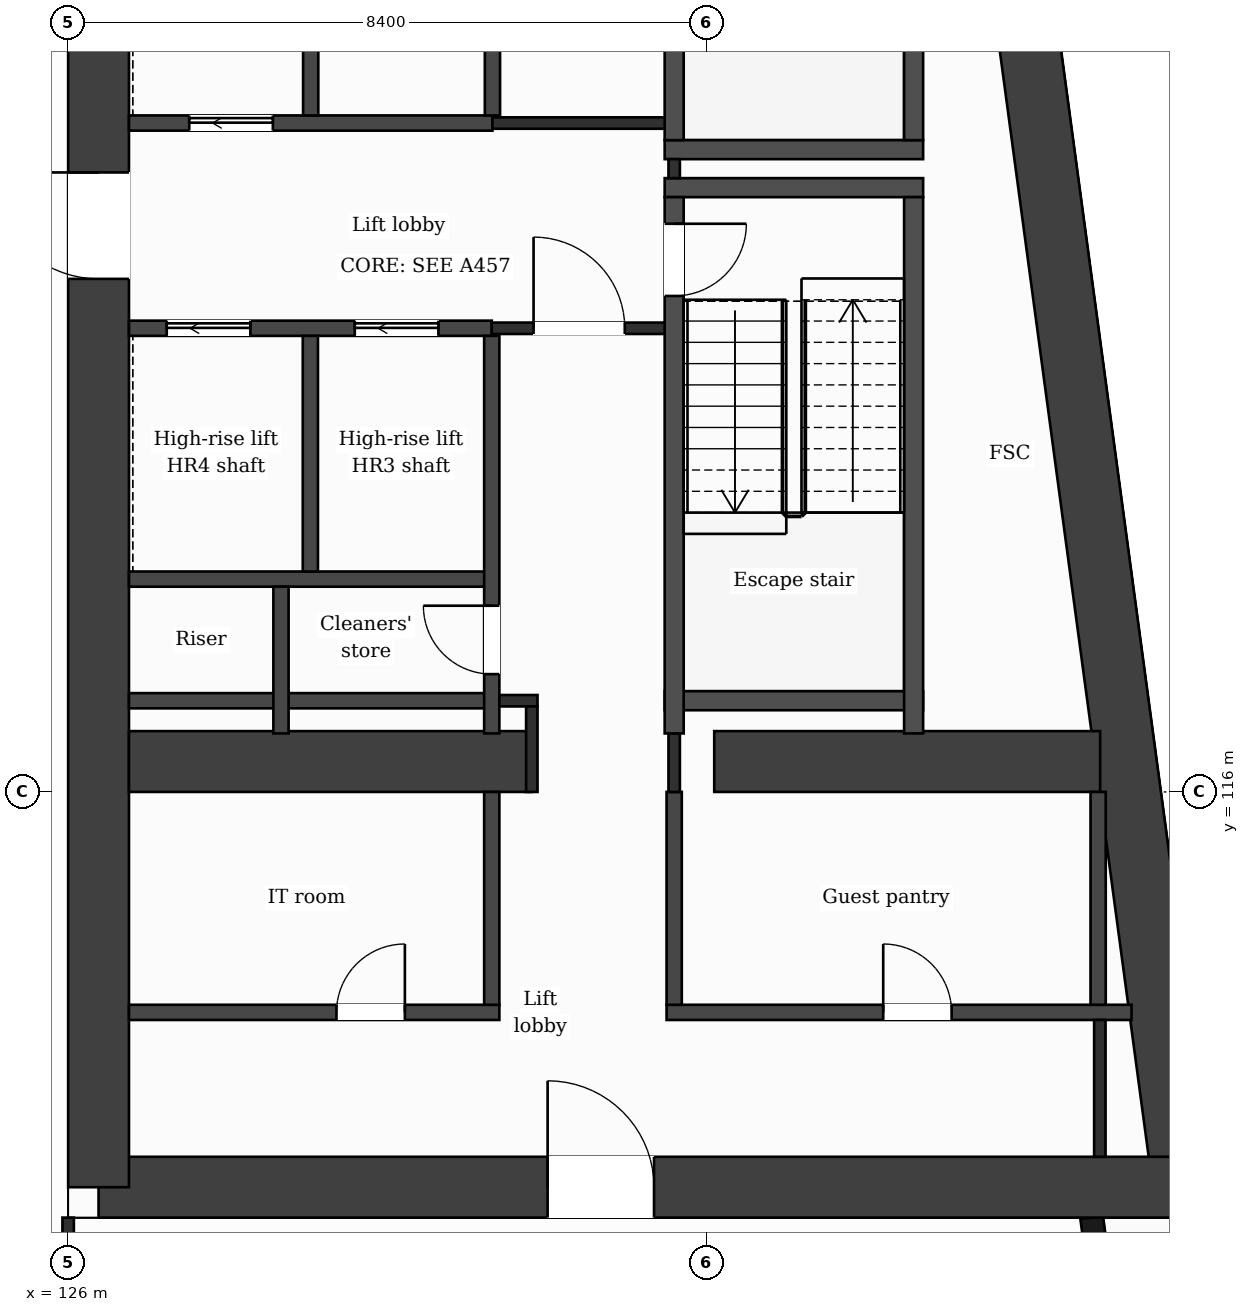
"""IFC4 building model, lengths in metres.
Left out: names, types, materials, properties, quantities, classifications, styles, units other than length and angle.
Written with IfcOpenShell. Run it as: python <this file> out.ifc"""

import sys

from ifc_helpers import new_model, si_unit, direction, frame, frame_2d, origin, place, context, subcontext, project, spatial, rectangle, extrude, element, fill, save


model = new_model("IFC4")
c1 = context("Model", 3, precision=1e-05, world=origin(), true_north=direction((0.0, 1.0)))
c2 = subcontext(c1, "Body", "Model", "MODEL_VIEW")
j1 = project(units=[si_unit("LENGTHUNIT", "METRE"), si_unit("PLANEANGLEUNIT", "RADIAN")], contexts=[c1])
p1 = place(None, origin())
s1 = spatial("IfcSite", under=j1, at=p1, CompositionType="ELEMENT")
p2 = place(p1, origin())
s2 = spatial("IfcBuilding", under=s1, at=p2, CompositionType="ELEMENT")
p3 = place(p2, frame((0.0, 0.0, 231.8)))
s3 = spatial("IfcBuildingStorey", under=s2, at=p3, CompositionType="ELEMENT", Elevation=231.8)
p4 = place(p3, frame((137.82, 132.0, 0.0), z_axis=(0.0, 0.0, 1.0), x_axis=(0.133408347329, -0.991061154956, 0.0)))
e1 = element("IfcWall", 1, at=p4, inside=s3, PredefinedType="SHEAR", context=c2, shape_type="SweptSolid", body=[
    extrude(rectangle(XDim=21.391, YDim=0.8, at=frame_2d((10.696, 0.0))), origin(), (0.0, 0.0, 1.0), 3.7),
])
p5 = place(p3, frame((140.673, 110.8, 0.0), z_axis=(0.0, 0.0, 1.0), x_axis=(-1.0, 0.0, 0.0)))
e2 = element("IfcWall", 2, at=p5, inside=s3, PredefinedType="SHEAR", context=c2, shape_type="SweptSolid", body=[
    extrude(rectangle(XDim=14.273, YDim=0.8, at=frame_2d((7.137, 0.0))), origin(), (0.0, 0.0, 1.0), 3.7),
])
p6 = place(p5, frame((6.965, 0.0, 0.0)))
e3 = element("IfcOpeningElement", 3, at=p6, cuts=e2, PredefinedType="OPENING", context=c2, shape_type="SweptSolid", body=[
    extrude(rectangle(XDim=1.4, YDim=2.1, at=frame_2d((0.7, 1.05))), frame((0.0, 0.41, 0.0), z_axis=(0.0, -1.0, 0.0), x_axis=(1.0, 0.0, 0.0)), (0.0, 0.0, 1.0), 0.82),
])
p7 = place(p3, frame((126.4, 110.8, 0.0), z_axis=(0.0, 0.0, 1.0), x_axis=(0.0, 1.0, 0.0)))
e4 = element("IfcWall", 4, at=p7, inside=s3, PredefinedType="SHEAR", context=c2, shape_type="SweptSolid", body=[
    extrude(rectangle(XDim=21.2, YDim=0.8, at=frame_2d((10.6, 0.0))), origin(), (0.0, 0.0, 1.0), 3.7),
])
p8 = place(p7, frame((11.95, 0.0, 0.0)))
e5 = element("IfcOpeningElement", 5, at=p8, cuts=e4, PredefinedType="OPENING", context=c2, shape_type="SweptSolid", body=[
    extrude(rectangle(XDim=1.4, YDim=2.1, at=frame_2d((0.7, 1.05))), frame((0.0, 0.41, 0.0), z_axis=(0.0, -1.0, 0.0), x_axis=(1.0, 0.0, 0.0)), (0.0, 0.0, 1.0), 0.82),
])
p9 = place(p3, frame((126.8, 116.4, 0.0), z_axis=(0.0, 0.0, 1.0), x_axis=(1.0, 0.0, 0.0)))
e6 = element("IfcWall", 6, at=p9, inside=s3, PredefinedType="SHEAR", context=c2, shape_type="SweptSolid", body=[
    extrude(rectangle(XDim=5.3, YDim=0.8, at=frame_2d((2.65, 0.0))), origin(), (0.0, 0.0, 1.0), 3.7),
])
p10 = place(p3, frame((134.5, 116.4, 0.0), z_axis=(0.0, 0.0, 1.0), x_axis=(1.0, 0.0, 0.0)))
e7 = element("IfcWall", 7, at=p10, inside=s3, PredefinedType="SHEAR", context=c2, shape_type="SweptSolid", body=[
    extrude(rectangle(XDim=5.077, YDim=0.8, at=frame_2d((2.539, 0.0))), origin(), (0.0, 0.0, 1.0), 3.7),
])
p11 = place(p3, frame((140.348, 103.85, 0.0), z_axis=(0.0, 0.0, 1.0), x_axis=(-0.133431549479, 0.991058031401, 0.0)))
e8 = element("IfcWall", 8, at=p11, inside=s3, PredefinedType="SOLIDWALL", context=c2, shape_type="SweptSolid", body=[
    extrude(rectangle(XDim=6.609, YDim=0.3, at=frame_2d((3.304, 0.0))), origin(), (0.0, 0.0, 1.0), 3.38),
])
p12 = place(p11, frame((0.737, 0.0, 0.9)))
e9 = element("IfcOpeningElement", 9, at=p12, cuts=e8, PredefinedType="OPENING", context=c2, shape_type="SweptSolid", body=[
    extrude(rectangle(XDim=1.2, YDim=2.1, at=frame_2d((0.6, 1.05))), frame((0.0, 0.16, 0.0), z_axis=(0.0, -1.0, 0.0), x_axis=(1.0, 0.0, 0.0)), (0.0, 0.0, 1.0), 0.32),
])
p13 = place(p11, frame((3.991, 0.0, 0.0)))
e10 = element("IfcOpeningElement", 10, at=p13, cuts=e8, PredefinedType="OPENING", context=c2, shape_type="SweptSolid", body=[
    extrude(rectangle(XDim=1.2, YDim=2.4, at=frame_2d((0.6, 1.2))), frame((0.0, 0.16, 0.0), z_axis=(0.0, -1.0, 0.0), x_axis=(1.0, 0.0, 0.0)), (0.0, 0.0, 1.0), 0.32),
])
p14 = place(p3, frame((126.8, 113.1, 0.0), z_axis=(0.0, 0.0, 1.0), x_axis=(1.0, 0.0, 0.0)))
e11 = element("IfcWall", 11, at=p14, inside=s3, PredefinedType="PARTITIONING", context=c2, shape_type="SweptSolid", body=[
    extrude(rectangle(XDim=4.873, YDim=0.2, at=frame_2d((2.437, 0.0))), origin(), (0.0, 0.0, 1.0), 3.38),
])
p15 = place(p14, frame((2.73, 0.0, 0.0)))
e12 = element("IfcOpeningElement", 12, at=p15, cuts=e11, PredefinedType="OPENING", context=c2, shape_type="SweptSolid", body=[
    extrude(rectangle(XDim=0.9, YDim=2.1, at=frame_2d((0.45, 1.05))), frame((0.0, 0.11, 0.0), z_axis=(0.0, -1.0, 0.0), x_axis=(1.0, 0.0, 0.0)), (0.0, 0.0, 1.0), 0.22),
])
p16 = place(p3, frame((133.873, 113.1, 0.0), z_axis=(0.0, 0.0, 1.0), x_axis=(1.0, 0.0, 0.0)))
e13 = element("IfcWall", 13, at=p16, inside=s3, PredefinedType="PARTITIONING", context=c2, shape_type="SweptSolid", body=[
    extrude(rectangle(XDim=6.117, YDim=0.2, at=frame_2d((3.059, 0.0))), origin(), (0.0, 0.0, 1.0), 3.38),
])
p17 = place(p16, frame((2.85, 0.0, 0.0)))
e14 = element("IfcOpeningElement", 14, at=p17, cuts=e13, PredefinedType="OPENING", context=c2, shape_type="SweptSolid", body=[
    extrude(rectangle(XDim=0.9, YDim=2.1, at=frame_2d((0.45, 1.05))), frame((0.0, 0.11, 0.0), z_axis=(0.0, -1.0, 0.0), x_axis=(1.0, 0.0, 0.0)), (0.0, 0.0, 1.0), 0.22),
])
p18 = place(p3, frame((126.8, 117.2, 0.0), z_axis=(0.0, 0.0, 1.0), x_axis=(1.0, 0.0, 0.0)))
e15 = element("IfcWall", 15, at=p18, inside=s3, PredefinedType="PARTITIONING", context=c2, shape_type="SweptSolid", body=[
    extrude(rectangle(XDim=4.773, YDim=0.2, at=frame_2d((2.386, 0.0))), origin(), (0.0, 0.0, 1.0), 3.38),
])
p19 = place(p3, frame((131.573, 117.2, 0.0), z_axis=(0.0, 0.0, 1.0), x_axis=(1.0, 0.0, 0.0)))
e16 = element("IfcWall", 16, at=p19, inside=s3, PredefinedType="PARTITIONING", context=c2, shape_type="SweptSolid", body=[
    extrude(rectangle(XDim=0.602, YDim=0.15, at=frame_2d((0.301, 0.0))), origin(), (0.0, 0.0, 1.0), 3.38),
])
p20 = place(p3, frame((133.848, 117.2, 0.0), z_axis=(0.0, 0.0, 1.0), x_axis=(1.0, 0.0, 0.0)))
e17 = element("IfcWall", 17, at=p20, inside=s3, PredefinedType="PARTITIONING", context=c2, shape_type="SweptSolid", body=[
    extrude(rectangle(XDim=3.4, YDim=0.25, at=frame_2d((1.7, 0.0))), origin(), (0.0, 0.0, 1.0), 3.38),
])
p21 = place(p3, frame((126.8, 118.8, 0.0), z_axis=(0.0, 0.0, 1.0), x_axis=(1.0, 0.0, 0.0)))
e18 = element("IfcWall", 18, at=p21, inside=s3, PredefinedType="PARTITIONING", context=c2, shape_type="SweptSolid", body=[
    extrude(rectangle(XDim=4.773, YDim=0.2, at=frame_2d((2.386, 0.0))), origin(), (0.0, 0.0, 1.0), 3.38),
])
p22 = place(p3, frame((126.8, 122.1, 0.0), z_axis=(0.0, 0.0, 1.0), x_axis=(1.0, 0.0, 0.0)))
e19 = element("IfcWall", 19, at=p22, inside=s3, PredefinedType="PARTITIONING", context=c2, shape_type="SweptSolid", body=[
    extrude(rectangle(XDim=4.773, YDim=0.2, at=frame_2d((2.386, 0.0))), origin(), (0.0, 0.0, 1.0), 3.38),
])
p23 = place(p22, frame((2.971, 0.0, 0.0)))
e20 = element("IfcOpeningElement", 20, at=p23, cuts=e19, PredefinedType="OPENING", context=c2, shape_type="SweptSolid", body=[
    extrude(rectangle(XDim=1.1, YDim=2.1, at=frame_2d((0.55, 1.05))), frame((0.0, 0.11, 0.0), z_axis=(0.0, -1.0, 0.0), x_axis=(1.0, 0.0, 0.0)), (0.0, 0.0, 1.0), 0.22),
])
p24 = place(p22, frame((0.497, 0.0, 0.0)))
e21 = element("IfcOpeningElement", 21, at=p24, cuts=e19, PredefinedType="OPENING", context=c2, shape_type="SweptSolid", body=[
    extrude(rectangle(XDim=1.1, YDim=2.1, at=frame_2d((0.55, 1.05))), frame((0.0, 0.11, 0.0), z_axis=(0.0, -1.0, 0.0), x_axis=(1.0, 0.0, 0.0)), (0.0, 0.0, 1.0), 0.22),
])
p25 = place(p3, frame((131.573, 122.1, 0.0), z_axis=(0.0, 0.0, 1.0), x_axis=(1.0, 0.0, 0.0)))
e22 = element("IfcWall", 22, at=p25, inside=s3, PredefinedType="PARTITIONING", context=c2, shape_type="SweptSolid", body=[
    extrude(rectangle(XDim=2.4, YDim=0.15, at=frame_2d((1.2, 0.0))), origin(), (0.0, 0.0, 1.0), 3.38),
])
p26 = place(p25, frame((0.55, 0.0, 0.0)))
e23 = element("IfcOpeningElement", 23, at=p26, cuts=e22, PredefinedType="OPENING", context=c2, shape_type="SweptSolid", body=[
    extrude(rectangle(XDim=1.2, YDim=2.1, at=frame_2d((0.6, 1.05))), frame((0.0, 0.085, 0.0), z_axis=(0.0, -1.0, 0.0), x_axis=(1.0, 0.0, 0.0)), (0.0, 0.0, 1.0), 0.17),
])
for number, where, z_axis, x_axis in (
    (24, (133.848, 123.95, 0.0), (0.0, 0.0, 1.0), (1.0, 0.0, 0.0)),
    (25, (133.848, 124.45, 0.0), (0.0, 0.0, 1.0), (1.0, 0.0, 0.0)),
):
    element("IfcWall", number, at=place(p3, frame(where, z_axis=z_axis, x_axis=x_axis)), inside=s3, PredefinedType="PARTITIONING", context=c2, shape_type="SweptSolid", body=[
        extrude(rectangle(XDim=3.4, YDim=0.25, at=frame_2d((1.7, 0.0))), origin(), (0.0, 0.0, 1.0), 3.38),
    ])
p27 = place(p3, frame((126.8, 124.8, 0.0), z_axis=(0.0, 0.0, 1.0), x_axis=(1.0, 0.0, 0.0)))
e26 = element("IfcWall", 26, at=p27, inside=s3, PredefinedType="PARTITIONING", context=c2, shape_type="SweptSolid", body=[
    extrude(rectangle(XDim=4.782, YDim=0.2, at=frame_2d((2.391, 0.0))), origin(), (0.0, 0.0, 1.0), 3.38),
])
p28 = place(p27, frame((0.793, 0.0, 0.0)))
e27 = element("IfcOpeningElement", 27, at=p28, cuts=e26, PredefinedType="OPENING", context=c2, shape_type="SweptSolid", body=[
    extrude(rectangle(XDim=1.1, YDim=2.1, at=frame_2d((0.55, 1.05))), frame((0.0, 0.11, 0.0), z_axis=(0.0, -1.0, 0.0), x_axis=(1.0, 0.0, 0.0)), (0.0, 0.0, 1.0), 0.22),
])
p29 = place(p3, frame((131.582, 124.8, 0.0), z_axis=(0.0, 0.0, 1.0), x_axis=(1.0, 0.0, 0.0)))
e28 = element("IfcWall", 28, at=p29, inside=s3, PredefinedType="PARTITIONING", context=c2, shape_type="SweptSolid", body=[
    extrude(rectangle(XDim=2.516, YDim=0.15, at=frame_2d((1.258, 0.0))), origin(), (0.0, 0.0, 1.0), 3.38),
])
p30 = place(p3, frame((126.0, 109.075, 0.0), z_axis=(0.0, 0.0, 1.0), x_axis=(0.0, 1.0, 0.0)))
e29 = element("IfcWall", 29, at=p30, inside=s3, PredefinedType="PARTITIONING", context=c2, shape_type="SweptSolid", body=[
    extrude(rectangle(XDim=1.325, YDim=0.15, at=frame_2d((0.663, 0.0))), origin(), (0.0, 0.0, 1.0), 3.38),
])
p31 = place(p3, frame((128.8, 116.77, 0.0), z_axis=(0.0, 0.0, 1.0), x_axis=(0.0, 1.0, 0.0)))
e30 = element("IfcWall", 30, at=p31, inside=s3, PredefinedType="PARTITIONING", context=c2, shape_type="SweptSolid", body=[
    extrude(rectangle(XDim=1.93, YDim=0.2, at=frame_2d((0.965, 0.0))), origin(), (0.0, 0.0, 1.0), 3.38),
])
for number, where, z_axis, x_axis in (
    (31, (129.187, 118.9, 0.0), (0.0, 0.0, 1.0), (0.0, 1.0, 0.0)),
    (32, (129.191, 124.9, 0.0), (0.0, 0.0, 1.0), (0.0, 1.0, 0.0)),
):
    element("IfcWall", number, at=place(p3, frame(where, z_axis=z_axis, x_axis=x_axis)), inside=s3, PredefinedType="PARTITIONING", context=c2, shape_type="SweptSolid", body=[
        extrude(rectangle(XDim=3.1, YDim=0.2, at=frame_2d((1.55, 0.0))), origin(), (0.0, 0.0, 1.0), 3.38),
    ])
p32 = place(p3, frame((131.573, 113.2, 0.0), z_axis=(0.0, 0.0, 1.0), x_axis=(0.0, 1.0, 0.0)))
e33 = element("IfcWall", 33, at=p32, inside=s3, PredefinedType="PARTITIONING", context=c2, shape_type="SweptSolid", body=[
    extrude(rectangle(XDim=2.8, YDim=0.2, at=frame_2d((1.4, 0.0))), origin(), (0.0, 0.0, 1.0), 3.38),
])
p33 = place(p3, frame((131.573, 116.77, 0.0), z_axis=(0.0, 0.0, 1.0), x_axis=(0.0, 1.0, 0.0)))
e34 = element("IfcWall", 34, at=p33, inside=s3, PredefinedType="PARTITIONING", context=c2, shape_type="SweptSolid", body=[
    extrude(rectangle(XDim=5.23, YDim=0.2, at=frame_2d((2.615, 0.0))), origin(), (0.0, 0.0, 1.0), 3.38),
])
p34 = place(p33, frame((0.78, 0.0, 0.0)))
e35 = element("IfcOpeningElement", 35, at=p34, cuts=e34, PredefinedType="OPENING", context=c2, shape_type="SweptSolid", body=[
    extrude(rectangle(XDim=0.9, YDim=2.1, at=frame_2d((0.45, 1.05))), frame((0.0, 0.11, 0.0), z_axis=(0.0, -1.0, 0.0), x_axis=(1.0, 0.0, 0.0)), (0.0, 0.0, 1.0), 0.22),
])
p35 = place(p3, frame((131.582, 124.9, 0.0), z_axis=(0.0, 0.0, 1.0), x_axis=(0.0, 1.0, 0.0)))
e36 = element("IfcWall", 36, at=p35, inside=s3, PredefinedType="PARTITIONING", context=c2, shape_type="SweptSolid", body=[
    extrude(rectangle(XDim=3.1, YDim=0.2, at=frame_2d((1.55, 0.0))), origin(), (0.0, 0.0, 1.0), 3.38),
])
p36 = place(p3, frame((132.1, 116.0, 0.0), z_axis=(0.0, 0.0, 1.0), x_axis=(0.0, 1.0, 0.0)))
e37 = element("IfcWall", 37, at=p36, inside=s3, PredefinedType="PARTITIONING", context=c2, shape_type="SweptSolid", body=[
    extrude(rectangle(XDim=1.125, YDim=0.15, at=frame_2d((0.562, 0.0))), origin(), (0.0, 0.0, 1.0), 3.38),
])
p37 = place(p3, frame((133.973, 113.2, 0.0), z_axis=(0.0, 0.0, 1.0), x_axis=(0.0, 1.0, 0.0)))
e38 = element("IfcWall", 38, at=p37, inside=s3, PredefinedType="PARTITIONING", context=c2, shape_type="SweptSolid", body=[
    extrude(rectangle(XDim=2.8, YDim=0.2, at=frame_2d((1.4, 0.0))), origin(), (0.0, 0.0, 1.0), 3.38),
])
p38 = place(p3, frame((133.973, 116.0, 0.0), z_axis=(0.0, 0.0, 1.0), x_axis=(0.0, 1.0, 0.0)))
e39 = element("IfcWall", 39, at=p38, inside=s3, PredefinedType="PARTITIONING", context=c2, shape_type="SweptSolid", body=[
    extrude(rectangle(XDim=0.77, YDim=0.15, at=frame_2d((0.385, 0.0))), origin(), (0.0, 0.0, 1.0), 3.38),
])
p39 = place(p3, frame((133.973, 124.075, 0.0), z_axis=(0.0, 0.0, 1.0), x_axis=(0.0, 1.0, 0.0)))
e40 = element("IfcWall", 40, at=p39, inside=s3, PredefinedType="PARTITIONING", context=c2, shape_type="SweptSolid", body=[
    extrude(rectangle(XDim=0.25, YDim=0.15, at=frame_2d((0.125, 0.0))), origin(), (0.0, 0.0, 1.0), 3.38),
])
p40 = place(p3, frame((133.973, 116.77, 0.0), z_axis=(0.0, 0.0, 1.0), x_axis=(0.0, 1.0, 0.0)))
e41 = element("IfcWall", 41, at=p40, inside=s3, PredefinedType="PARTITIONING", context=c2, shape_type="SweptSolid", body=[
    extrude(rectangle(XDim=7.055, YDim=0.25, at=frame_2d((3.527, 0.0))), origin(), (0.0, 0.0, 1.0), 3.38),
])
p41 = place(p40, frame((5.755, 0.0, 0.0)))
e42 = element("IfcOpeningElement", 42, at=p41, cuts=e41, PredefinedType="OPENING", context=c2, shape_type="SweptSolid", body=[
    extrude(rectangle(XDim=0.95, YDim=2.1, at=frame_2d((0.475, 1.05))), frame((0.0, 0.135, 0.0), z_axis=(0.0, -1.0, 0.0), x_axis=(1.0, 0.0, 0.0)), (0.0, 0.0, 1.0), 0.27),
])
p42 = place(p3, frame((133.973, 124.575, 0.0), z_axis=(0.0, 0.0, 1.0), x_axis=(0.0, 1.0, 0.0)))
e43 = element("IfcWall", 43, at=p42, inside=s3, PredefinedType="PARTITIONING", context=c2, shape_type="SweptSolid", body=[
    extrude(rectangle(XDim=7.055, YDim=0.25, at=frame_2d((3.527, 0.0))), origin(), (0.0, 0.0, 1.0), 3.38),
])
p43 = place(p42, frame((5.325, 0.0, 0.0)))
e44 = element("IfcOpeningElement", 44, at=p43, cuts=e43, PredefinedType="OPENING", context=c2, shape_type="SweptSolid", body=[
    extrude(rectangle(XDim=1.0, YDim=2.1, at=frame_2d((0.5, 1.05))), frame((0.0, 0.135, 0.0), z_axis=(0.0, -1.0, 0.0), x_axis=(1.0, 0.0, 0.0)), (0.0, 0.0, 1.0), 0.27),
])
for number, where, z_axis, x_axis in (
    (45, (137.123, 116.77, 0.0), (0.0, 0.0, 1.0), (0.0, 1.0, 0.0)),
    (46, (137.123, 124.575, 0.0), (0.0, 0.0, 1.0), (0.0, 1.0, 0.0)),
):
    element("IfcWall", number, at=place(p3, frame(where, z_axis=z_axis, x_axis=x_axis)), inside=s3, PredefinedType="PARTITIONING", context=c2, shape_type="SweptSolid", body=[
        extrude(rectangle(XDim=7.055, YDim=0.25, at=frame_2d((3.527, 0.0))), origin(), (0.0, 0.0, 1.0), 3.38),
    ])
p44 = place(p3, frame((139.551, 113.2, 0.0), z_axis=(0.0, 0.0, 1.0), x_axis=(0.0, 1.0, 0.0)))
e47 = element("IfcWall", 47, at=p44, inside=s3, PredefinedType="PARTITIONING", context=c2, shape_type="SweptSolid", body=[
    extrude(rectangle(XDim=2.8, YDim=0.2, at=frame_2d((1.4, 0.0))), origin(), (0.0, 0.0, 1.0), 3.38),
])
p45 = place(p3, frame((139.573, 111.2, 0.0), z_axis=(0.0, 0.0, 1.0), x_axis=(0.0, 1.0, 0.0)))
e48 = element("IfcWall", 48, at=p45, inside=s3, PredefinedType="PARTITIONING", context=c2, shape_type="SweptSolid", body=[
    extrude(rectangle(XDim=1.8, YDim=0.15, at=frame_2d((0.9, 0.0))), origin(), (0.0, 0.0, 1.0), 3.38),
])
p46 = place(p26, origin())
e49 = element("IfcDoor", 49, at=p46, inside=s3, OperationType="SINGLE_SWING_LEFT", PredefinedType="DOOR", context=c2, shape_type="SweptSolid", body=[
    extrude(rectangle(XDim=1.2, YDim=2.1, at=frame_2d((0.6, 1.05))), frame((0.0, 0.025, 0.0), z_axis=(0.0, -1.0, 0.0), x_axis=(1.0, 0.0, 0.0)), (0.0, 0.0, 1.0), 0.05),
])
fill(e23, e49)
p47 = place(p23, origin())
e50 = element("IfcDoor", 50, at=p47, inside=s3, OperationType="SLIDING_TO_LEFT", PredefinedType="DOOR", context=c2, shape_type="SweptSolid", body=[
    extrude(rectangle(XDim=1.1, YDim=2.1, at=frame_2d((0.55, 1.05))), frame((0.0, 0.025, 0.0), z_axis=(0.0, -1.0, 0.0), x_axis=(1.0, 0.0, 0.0)), (0.0, 0.0, 1.0), 0.05),
])
fill(e20, e50)
p48 = place(p24, origin())
e51 = element("IfcDoor", 51, at=p48, inside=s3, OperationType="SLIDING_TO_LEFT", PredefinedType="DOOR", context=c2, shape_type="SweptSolid", body=[
    extrude(rectangle(XDim=1.1, YDim=2.1, at=frame_2d((0.55, 1.05))), frame((0.0, 0.025, 0.0), z_axis=(0.0, -1.0, 0.0), x_axis=(1.0, 0.0, 0.0)), (0.0, 0.0, 1.0), 0.05),
])
fill(e21, e51)
p49 = place(p28, origin())
e52 = element("IfcDoor", 52, at=p49, inside=s3, OperationType="SLIDING_TO_LEFT", PredefinedType="DOOR", context=c2, shape_type="SweptSolid", body=[
    extrude(rectangle(XDim=1.1, YDim=2.1, at=frame_2d((0.55, 1.05))), frame((0.0, 0.025, 0.0), z_axis=(0.0, -1.0, 0.0), x_axis=(1.0, 0.0, 0.0)), (0.0, 0.0, 1.0), 0.05),
])
fill(e27, e52)
p50 = place(p41, origin())
e53 = element("IfcDoor", 53, at=p50, inside=s3, OperationType="SINGLE_SWING_RIGHT", PredefinedType="DOOR", context=c2, shape_type="SweptSolid", body=[
    extrude(rectangle(XDim=0.95, YDim=2.1, at=frame_2d((0.475, 1.05))), frame((0.0, 0.025, 0.0), z_axis=(0.0, -1.0, 0.0), x_axis=(1.0, 0.0, 0.0)), (0.0, 0.0, 1.0), 0.05),
])
fill(e42, e53)
p51 = place(p34, origin())
e54 = element("IfcDoor", 54, at=p51, inside=s3, OperationType="SINGLE_SWING_RIGHT", PredefinedType="DOOR", context=c2, shape_type="SweptSolid", body=[
    extrude(rectangle(XDim=0.9, YDim=2.1, at=frame_2d((0.45, 1.05))), frame((0.0, 0.025, 0.0), z_axis=(0.0, -1.0, 0.0), x_axis=(1.0, 0.0, 0.0)), (0.0, 0.0, 1.0), 0.05),
])
fill(e35, e54)
p52 = place(p17, origin())
e55 = element("IfcDoor", 55, at=p52, inside=s3, OperationType="SINGLE_SWING_LEFT", PredefinedType="DOOR", context=c2, shape_type="SweptSolid", body=[
    extrude(rectangle(XDim=0.9, YDim=2.1, at=frame_2d((0.45, 1.05))), frame((0.0, 0.025, 0.0), z_axis=(0.0, -1.0, 0.0), x_axis=(1.0, 0.0, 0.0)), (0.0, 0.0, 1.0), 0.05),
])
fill(e14, e55)
p53 = place(p15, origin())
e56 = element("IfcDoor", 56, at=p53, inside=s3, OperationType="SINGLE_SWING_RIGHT", PredefinedType="DOOR", context=c2, shape_type="SweptSolid", body=[
    extrude(rectangle(XDim=0.9, YDim=2.1, at=frame_2d((0.45, 1.05))), frame((0.0, 0.025, 0.0), z_axis=(0.0, -1.0, 0.0), x_axis=(1.0, 0.0, 0.0)), (0.0, 0.0, 1.0), 0.05),
])
fill(e12, e56)
p54 = place(p6, origin())
e57 = element("IfcDoor", 57, at=p54, inside=s3, OperationType="SINGLE_SWING_RIGHT", PredefinedType="DOOR", context=c2, shape_type="SweptSolid", body=[
    extrude(rectangle(XDim=1.4, YDim=2.1, at=frame_2d((0.7, 1.05))), frame((0.0, 0.025, 0.0), z_axis=(0.0, -1.0, 0.0), x_axis=(1.0, 0.0, 0.0)), (0.0, 0.0, 1.0), 0.05),
])
fill(e3, e57)
p55 = place(p8, origin())
e58 = element("IfcDoor", 58, at=p55, inside=s3, OperationType="SINGLE_SWING_RIGHT", PredefinedType="DOOR", context=c2, shape_type="SweptSolid", body=[
    extrude(rectangle(XDim=1.4, YDim=2.1, at=frame_2d((0.7, 1.05))), frame((0.0, 0.025, 0.0), z_axis=(0.0, -1.0, 0.0), x_axis=(1.0, 0.0, 0.0)), (0.0, 0.0, 1.0), 0.05),
])
fill(e5, e58)
save(model, sys.argv[1])
